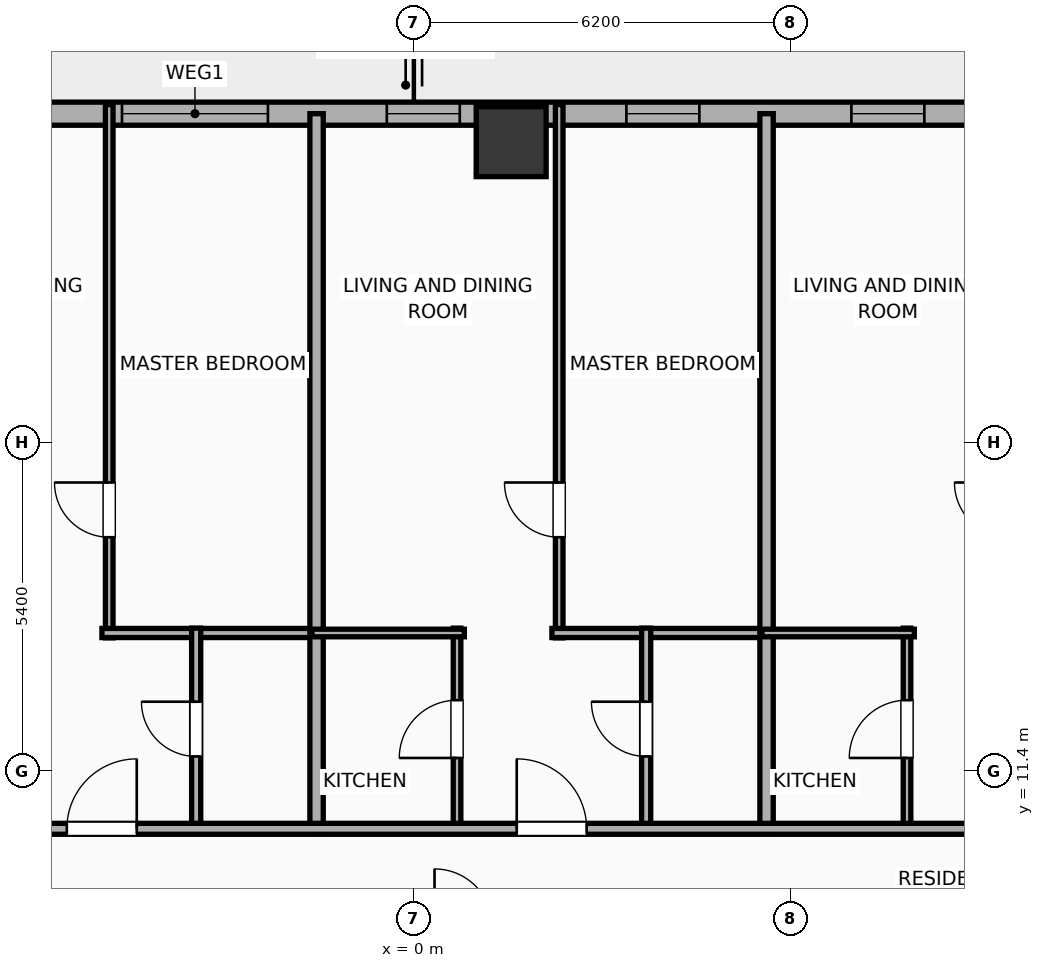
"""IFC4 building model, lengths in metres.
Left out: names, types, materials, properties, quantities, classifications, styles, units other than length and angle.
Written with IfcOpenShell. Run it as: python <this file> out.ifc"""

import sys

from ifc_helpers import new_model, si_unit, direction, frame, frame_2d, origin, origin_2d, place, context, subcontext, project, spatial, rectangle, hollow_rectangle, extrude, element, fill, save


model = new_model("IFC4")
c1 = context("Model", 3, precision=1e-05, world=origin(), true_north=direction((0.0, 1.0)))
c2 = subcontext(c1, "Body", "Model", "MODEL_VIEW")
j1 = project(units=[si_unit("LENGTHUNIT", "METRE"), si_unit("PLANEANGLEUNIT", "RADIAN")], contexts=[c1])
p1 = place(None, origin())
s1 = spatial("IfcSite", under=j1, at=p1, CompositionType="ELEMENT")
p2 = place(p1, origin())
s2 = spatial("IfcBuilding", under=s1, at=p2, CompositionType="ELEMENT")
p3 = place(p2, frame((0.0, 0.0, 26.0)))
s3 = spatial("IfcBuildingStorey", under=s2, at=p3, CompositionType="ELEMENT", Elevation=26.0)
p4 = place(p3, frame((1.6, 21.75, -0.25), z_axis=(0.0, 0.0, 1.0), x_axis=(1.0, 0.0, 0.0)))
e1 = element("IfcColumn", 1, at=p4, inside=s3, PredefinedType="COLUMN", context=c2, shape_type="SweptSolid", body=[
    extrude(hollow_rectangle(XDim=1.15, YDim=1.15, WallThickness=0.04, at=origin_2d()), origin(), (0.0, 0.0, 1.0), 4.15),
])
p5 = place(p3, frame((-29.581, 22.21, 0.0), z_axis=(0.0, 0.0, 1.0), x_axis=(1.0, 0.0, 0.0)))
e2 = element("IfcWall", 2, at=p5, inside=s3, PredefinedType="ELEMENTEDWALL", context=c2, shape_type="SweptSolid", body=[
    extrude(rectangle(XDim=51.963, YDim=0.38, at=frame_2d((25.981, 0.0))), origin(), (0.0, 0.0, 1.0), 2.54),
])
p6 = place(p5, frame((6.61, 0.0, 0.75)))
e3 = element("IfcOpeningElement", 3, at=p6, cuts=e2, PredefinedType="OPENING", context=c2, shape_type="SweptSolid", body=[
    extrude(rectangle(XDim=2.4, YDim=1.63, at=frame_2d((1.2, 0.815))), frame((0.0, 0.2, 0.0), z_axis=(0.0, -1.0, 0.0), x_axis=(1.0, 0.0, 0.0)), (0.0, 0.0, 1.0), 0.4),
])
p7 = place(p5, frame((24.781, 0.0, 0.75)))
e4 = element("IfcOpeningElement", 4, at=p7, cuts=e2, PredefinedType="OPENING", context=c2, shape_type="SweptSolid", body=[
    extrude(rectangle(XDim=2.4, YDim=1.63, at=frame_2d((1.2, 0.815))), frame((0.0, 0.2, 0.0), z_axis=(0.0, -1.0, 0.0), x_axis=(1.0, 0.0, 0.0)), (0.0, 0.0, 1.0), 0.4),
])
p8 = place(p5, frame((42.952, 0.0, 0.75)))
e5 = element("IfcOpeningElement", 5, at=p8, cuts=e2, PredefinedType="OPENING", context=c2, shape_type="SweptSolid", body=[
    extrude(rectangle(XDim=2.4, YDim=1.63, at=frame_2d((1.2, 0.815))), frame((0.0, 0.2, 0.0), z_axis=(0.0, -1.0, 0.0), x_axis=(1.0, 0.0, 0.0)), (0.0, 0.0, 1.0), 0.4),
])
p9 = place(p5, frame((3.476, 0.0, 0.75)))
e6 = element("IfcOpeningElement", 6, at=p9, cuts=e2, PredefinedType="OPENING", context=c2, shape_type="SweptSolid", body=[
    extrude(rectangle(XDim=1.2, YDim=1.63, at=frame_2d((0.6, 0.815))), frame((0.0, 0.2, 0.0), z_axis=(0.0, -1.0, 0.0), x_axis=(1.0, 0.0, 0.0)), (0.0, 0.0, 1.0), 0.4),
])
p10 = place(p5, frame((11.236, 0.0, 0.75)))
e7 = element("IfcOpeningElement", 7, at=p10, cuts=e2, PredefinedType="OPENING", context=c2, shape_type="SweptSolid", body=[
    extrude(rectangle(XDim=1.2, YDim=1.63, at=frame_2d((0.6, 0.815))), frame((0.0, 0.2, 0.0), z_axis=(0.0, -1.0, 0.0), x_axis=(1.0, 0.0, 0.0)), (0.0, 0.0, 1.0), 0.4),
])
p11 = place(p5, frame((14.576, 0.0, 0.75)))
e8 = element("IfcOpeningElement", 8, at=p11, cuts=e2, PredefinedType="OPENING", context=c2, shape_type="SweptSolid", body=[
    extrude(rectangle(XDim=1.2, YDim=1.63, at=frame_2d((0.6, 0.815))), frame((0.0, 0.2, 0.0), z_axis=(0.0, -1.0, 0.0), x_axis=(1.0, 0.0, 0.0)), (0.0, 0.0, 1.0), 0.4),
])
p12 = place(p5, frame((18.276, 0.0, 0.75)))
e9 = element("IfcOpeningElement", 9, at=p12, cuts=e2, PredefinedType="OPENING", context=c2, shape_type="SweptSolid", body=[
    extrude(rectangle(XDim=1.2, YDim=1.63, at=frame_2d((0.6, 0.815))), frame((0.0, 0.2, 0.0), z_axis=(0.0, -1.0, 0.0), x_axis=(1.0, 0.0, 0.0)), (0.0, 0.0, 1.0), 0.4),
])
p13 = place(p5, frame((21.976, 0.0, 0.75)))
e10 = element("IfcOpeningElement", 10, at=p13, cuts=e2, PredefinedType="OPENING", context=c2, shape_type="SweptSolid", body=[
    extrude(rectangle(XDim=1.2, YDim=1.63, at=frame_2d((0.6, 0.815))), frame((0.0, 0.2, 0.0), z_axis=(0.0, -1.0, 0.0), x_axis=(1.0, 0.0, 0.0)), (0.0, 0.0, 1.0), 0.4),
])
p14 = place(p5, frame((29.136, 0.0, 0.75)))
e11 = element("IfcOpeningElement", 11, at=p14, cuts=e2, PredefinedType="OPENING", context=c2, shape_type="SweptSolid", body=[
    extrude(rectangle(XDim=1.2, YDim=1.63, at=frame_2d((0.6, 0.815))), frame((0.0, 0.2, 0.0), z_axis=(0.0, -1.0, 0.0), x_axis=(1.0, 0.0, 0.0)), (0.0, 0.0, 1.0), 0.4),
])
p15 = place(p5, frame((33.076, 0.0, 0.75)))
e12 = element("IfcOpeningElement", 12, at=p15, cuts=e2, PredefinedType="OPENING", context=c2, shape_type="SweptSolid", body=[
    extrude(rectangle(XDim=1.2, YDim=1.63, at=frame_2d((0.6, 0.815))), frame((0.0, 0.2, 0.0), z_axis=(0.0, -1.0, 0.0), x_axis=(1.0, 0.0, 0.0)), (0.0, 0.0, 1.0), 0.4),
])
p16 = place(p5, frame((36.776, 0.0, 0.75)))
e13 = element("IfcOpeningElement", 13, at=p16, cuts=e2, PredefinedType="OPENING", context=c2, shape_type="SweptSolid", body=[
    extrude(rectangle(XDim=1.2, YDim=1.63, at=frame_2d((0.6, 0.815))), frame((0.0, 0.2, 0.0), z_axis=(0.0, -1.0, 0.0), x_axis=(1.0, 0.0, 0.0)), (0.0, 0.0, 1.0), 0.4),
])
p17 = place(p5, frame((39.931, 0.0, 0.75)))
e14 = element("IfcOpeningElement", 14, at=p17, cuts=e2, PredefinedType="OPENING", context=c2, shape_type="SweptSolid", body=[
    extrude(rectangle(XDim=0.85, YDim=1.63, at=frame_2d((0.425, 0.815))), frame((0.0, 0.2, 0.0), z_axis=(0.0, -1.0, 0.0), x_axis=(1.0, 0.0, 0.0)), (0.0, 0.0, 1.0), 0.4),
])
p18 = place(p5, frame((47.469, 0.0, 0.75)))
e15 = element("IfcOpeningElement", 15, at=p18, cuts=e2, PredefinedType="OPENING", context=c2, shape_type="SweptSolid", body=[
    extrude(rectangle(XDim=1.2, YDim=1.63, at=frame_2d((0.6, 0.815))), frame((0.0, 0.2, 0.0), z_axis=(0.0, -1.0, 0.0), x_axis=(1.0, 0.0, 0.0)), (0.0, 0.0, 1.0), 0.4),
])
p19 = place(p5, frame((49.581, 0.0, 0.75)))
e16 = element("IfcOpeningElement", 16, at=p19, cuts=e2, PredefinedType="OPENING", context=c2, shape_type="SweptSolid", body=[
    extrude(rectangle(XDim=1.2, YDim=1.63, at=frame_2d((0.6, 0.815))), frame((0.0, 0.2, 0.0), z_axis=(0.0, -1.0, 0.0), x_axis=(1.0, 0.0, 0.0)), (0.0, 0.0, 1.0), 0.4),
])
p20 = place(p3, frame((-5.01, 13.59, 0.0), z_axis=(0.0, 0.0, 1.0), x_axis=(0.0, 1.0, 0.0)))
e17 = element("IfcWall", 17, at=p20, inside=s3, PredefinedType="PARTITIONING", context=c2, shape_type="SweptSolid", body=[
    extrude(rectangle(XDim=8.77, YDim=0.125, at=frame_2d((4.385, 0.0))), origin(), (0.0, 0.0, 1.0), 3.65),
])
p21 = place(p20, frame((1.655, 0.0, 0.0)))
e18 = element("IfcOpeningElement", 18, at=p21, cuts=e17, PredefinedType="OPENING", context=c2, shape_type="SweptSolid", body=[
    extrude(rectangle(XDim=0.9, YDim=2.05, at=frame_2d((0.45, 1.025))), frame((0.0, 0.073, 0.0), z_axis=(0.0, -1.0, 0.0), x_axis=(1.0, 0.0, 0.0)), (0.0, 0.0, 1.0), 0.145),
])
p22 = place(p3, frame((-5.13, 13.67, 0.0), z_axis=(0.0, 0.0, 1.0), x_axis=(1.0, 0.0, 0.0)))
e19 = element("IfcWall", 19, at=p22, inside=s3, PredefinedType="PLUMBINGWALL", context=c2, shape_type="SweptSolid", body=[
    extrude(rectangle(XDim=3.605, YDim=0.15, at=frame_2d((1.802, 0.0))), origin(), (0.0, 0.0, 1.0), 3.65),
])
p23 = place(p3, frame((-3.58, 10.43, 0.0), z_axis=(0.0, 0.0, 1.0), x_axis=(0.0, 1.0, 0.0)))
e20 = element("IfcWall", 20, at=p23, inside=s3, PredefinedType="PLUMBINGWALL", context=c2, shape_type="SweptSolid", body=[
    extrude(rectangle(XDim=3.32, YDim=0.15, at=frame_2d((1.66, 0.0))), origin(), (0.0, 0.0, 1.0), 3.65),
])
p24 = place(p23, frame((1.21, 0.0, 0.0)))
e21 = element("IfcOpeningElement", 21, at=p24, cuts=e20, PredefinedType="OPENING", context=c2, shape_type="SweptSolid", body=[
    extrude(rectangle(XDim=0.9, YDim=2.05, at=frame_2d((0.45, 1.025))), frame((0.0, 0.085, 0.0), z_axis=(0.0, -1.0, 0.0), x_axis=(1.0, 0.0, 0.0)), (0.0, 0.0, 1.0), 0.17),
])
p25 = place(p3, frame((-1.6, 10.37, 0.0), z_axis=(0.0, 0.0, 1.0), x_axis=(0.0, 1.0, 0.0)))
e22 = element("IfcWall", 22, at=p25, inside=s3, PredefinedType="PARTITIONING", context=c2, shape_type="SweptSolid", body=[
    extrude(rectangle(XDim=11.84, YDim=0.22, at=frame_2d((5.92, 0.0))), origin(), (0.0, 0.0, 1.0), 3.65),
])
p26 = place(p3, frame((2.39, 13.59, 0.0), z_axis=(0.0, 0.0, 1.0), x_axis=(0.0, 1.0, 0.0)))
e23 = element("IfcWall", 23, at=p26, inside=s3, PredefinedType="PARTITIONING", context=c2, shape_type="SweptSolid", body=[
    extrude(rectangle(XDim=8.77, YDim=0.125, at=frame_2d((4.385, 0.0))), origin(), (0.0, 0.0, 1.0), 2.54),
])
p27 = place(p26, frame((1.655, 0.0, 0.0)))
e24 = element("IfcOpeningElement", 24, at=p27, cuts=e23, PredefinedType="OPENING", context=c2, shape_type="SweptSolid", body=[
    extrude(rectangle(XDim=0.9, YDim=2.05, at=frame_2d((0.45, 1.025))), frame((0.0, 0.073, 0.0), z_axis=(0.0, -1.0, 0.0), x_axis=(1.0, 0.0, 0.0)), (0.0, 0.0, 1.0), 0.145),
])
p28 = place(p3, frame((2.27, 13.67, 0.0), z_axis=(0.0, 0.0, 1.0), x_axis=(1.0, 0.0, 0.0)))
e25 = element("IfcWall", 25, at=p28, inside=s3, PredefinedType="PLUMBINGWALL", context=c2, shape_type="SweptSolid", body=[
    extrude(rectangle(XDim=3.605, YDim=0.15, at=frame_2d((1.802, 0.0))), origin(), (0.0, 0.0, 1.0), 3.65),
])
p29 = place(p3, frame((0.71, 10.43, 0.0), z_axis=(0.0, 0.0, 1.0), x_axis=(0.0, 1.0, 0.0)))
e26 = element("IfcWall", 26, at=p29, inside=s3, PredefinedType="PARTITIONING", context=c2, shape_type="SweptSolid", body=[
    extrude(rectangle(XDim=3.32, YDim=0.125, at=frame_2d((1.66, 0.0))), origin(), (0.0, 0.0, 1.0), 3.65),
])
p30 = place(p29, frame((1.185, 0.0, 0.0)))
e27 = element("IfcOpeningElement", 27, at=p30, cuts=e26, PredefinedType="OPENING", context=c2, shape_type="SweptSolid", body=[
    extrude(rectangle(XDim=0.95, YDim=2.05, at=frame_2d((0.475, 1.025))), frame((0.0, 0.073, 0.0), z_axis=(0.0, -1.0, 0.0), x_axis=(1.0, 0.0, 0.0)), (0.0, 0.0, 1.0), 0.145),
])
p31 = place(p3, frame((-1.675, 13.67, 0.0), z_axis=(0.0, 0.0, 1.0), x_axis=(1.0, 0.0, 0.0)))
e28 = element("IfcWall", 28, at=p31, inside=s3, PredefinedType="PARTITIONING", context=c2, shape_type="SweptSolid", body=[
    extrude(rectangle(XDim=2.505, YDim=0.125, at=frame_2d((1.252, 0.0))), origin(), (0.0, 0.0, 1.0), 3.65),
])
p32 = place(p3, frame((3.82, 10.43, 0.0), z_axis=(0.0, 0.0, 1.0), x_axis=(0.0, 1.0, 0.0)))
e29 = element("IfcWall", 29, at=p32, inside=s3, PredefinedType="PLUMBINGWALL", context=c2, shape_type="SweptSolid", body=[
    extrude(rectangle(XDim=3.32, YDim=0.15, at=frame_2d((1.66, 0.0))), origin(), (0.0, 0.0, 1.0), 2.54),
])
p33 = place(p32, frame((1.21, 0.0, 0.0)))
e30 = element("IfcOpeningElement", 30, at=p33, cuts=e29, PredefinedType="OPENING", context=c2, shape_type="SweptSolid", body=[
    extrude(rectangle(XDim=0.9, YDim=2.05, at=frame_2d((0.45, 1.025))), frame((0.0, 0.085, 0.0), z_axis=(0.0, -1.0, 0.0), x_axis=(1.0, 0.0, 0.0)), (0.0, 0.0, 1.0), 0.17),
])
p34 = place(p3, frame((5.8, 10.37, 0.0), z_axis=(0.0, 0.0, 1.0), x_axis=(0.0, 1.0, 0.0)))
e31 = element("IfcWall", 31, at=p34, inside=s3, PredefinedType="PARTITIONING", context=c2, shape_type="SweptSolid", body=[
    extrude(rectangle(XDim=11.84, YDim=0.22, at=frame_2d((5.92, 0.0))), origin(), (0.0, 0.0, 1.0), 3.65),
])
p35 = place(p3, frame((8.11, 10.43, 0.0), z_axis=(0.0, 0.0, 1.0), x_axis=(0.0, 1.0, 0.0)))
e32 = element("IfcWall", 32, at=p35, inside=s3, PredefinedType="PARTITIONING", context=c2, shape_type="SweptSolid", body=[
    extrude(rectangle(XDim=3.32, YDim=0.125, at=frame_2d((1.66, 0.0))), origin(), (0.0, 0.0, 1.0), 3.65),
])
p36 = place(p35, frame((1.185, 0.0, 0.0)))
e33 = element("IfcOpeningElement", 33, at=p36, cuts=e32, PredefinedType="OPENING", context=c2, shape_type="SweptSolid", body=[
    extrude(rectangle(XDim=0.95, YDim=2.05, at=frame_2d((0.475, 1.025))), frame((0.0, 0.073, 0.0), z_axis=(0.0, -1.0, 0.0), x_axis=(1.0, 0.0, 0.0)), (0.0, 0.0, 1.0), 0.145),
])
p37 = place(p3, frame((5.725, 13.67, 0.0), z_axis=(0.0, 0.0, 1.0), x_axis=(1.0, 0.0, 0.0)))
e34 = element("IfcWall", 34, at=p37, inside=s3, PredefinedType="PARTITIONING", context=c2, shape_type="SweptSolid", body=[
    extrude(rectangle(XDim=2.505, YDim=0.125, at=frame_2d((1.252, 0.0))), origin(), (0.0, 0.0, 1.0), 3.65),
])
p38 = place(p3, frame((-33.41, 10.45, 0.0), z_axis=(0.0, 0.0, 1.0), x_axis=(1.0, 0.0, 0.0)))
e35 = element("IfcWall", 35, at=p38, inside=s3, PredefinedType="PARTITIONING", context=c2, shape_type="SweptSolid", body=[
    extrude(rectangle(XDim=59.62, YDim=0.18, at=frame_2d((29.81, 0.0))), origin(), (0.0, 0.0, 1.0), 3.65),
])
p39 = place(p38, frame((4.529, 0.0, 0.0)))
e36 = element("IfcOpeningElement", 36, at=p39, cuts=e35, PredefinedType="OPENING", context=c2, shape_type="SweptSolid", body=[
    extrude(rectangle(XDim=1.15, YDim=2.05, at=frame_2d((0.575, 1.025))), frame((0.0, 0.1, 0.0), z_axis=(0.0, -1.0, 0.0), x_axis=(1.0, 0.0, 0.0)), (0.0, 0.0, 1.0), 0.2),
])
p40 = place(p38, frame((12.899, 0.0, 0.0)))
e37 = element("IfcOpeningElement", 37, at=p40, cuts=e35, PredefinedType="OPENING", context=c2, shape_type="SweptSolid", body=[
    extrude(rectangle(XDim=1.15, YDim=2.05, at=frame_2d((0.575, 1.025))), frame((0.0, 0.1, 0.0), z_axis=(0.0, -1.0, 0.0), x_axis=(1.0, 0.0, 0.0)), (0.0, 0.0, 1.0), 0.2),
])
p41 = place(p38, frame((20.298, 0.0, 0.0)))
e38 = element("IfcOpeningElement", 38, at=p41, cuts=e35, PredefinedType="OPENING", context=c2, shape_type="SweptSolid", body=[
    extrude(rectangle(XDim=1.15, YDim=2.05, at=frame_2d((0.575, 1.025))), frame((0.0, 0.1, 0.0), z_axis=(0.0, -1.0, 0.0), x_axis=(1.0, 0.0, 0.0)), (0.0, 0.0, 1.0), 0.2),
])
p42 = place(p38, frame((27.703, 0.0, 0.0)))
e39 = element("IfcOpeningElement", 39, at=p42, cuts=e35, PredefinedType="OPENING", context=c2, shape_type="SweptSolid", body=[
    extrude(rectangle(XDim=1.15, YDim=2.05, at=frame_2d((0.575, 1.025))), frame((0.0, 0.1, 0.0), z_axis=(0.0, -1.0, 0.0), x_axis=(1.0, 0.0, 0.0)), (0.0, 0.0, 1.0), 0.2),
])
p43 = place(p38, frame((35.102, 0.0, 0.0)))
e40 = element("IfcOpeningElement", 40, at=p43, cuts=e35, PredefinedType="OPENING", context=c2, shape_type="SweptSolid", body=[
    extrude(rectangle(XDim=1.15, YDim=2.05, at=frame_2d((0.575, 1.025))), frame((0.0, 0.1, 0.0), z_axis=(0.0, -1.0, 0.0), x_axis=(1.0, 0.0, 0.0)), (0.0, 0.0, 1.0), 0.2),
])
p44 = place(p38, frame((42.5, 0.0, 0.0)))
e41 = element("IfcOpeningElement", 41, at=p44, cuts=e35, PredefinedType="OPENING", context=c2, shape_type="SweptSolid", body=[
    extrude(rectangle(XDim=1.15, YDim=2.05, at=frame_2d((0.575, 1.025))), frame((0.0, 0.1, 0.0), z_axis=(0.0, -1.0, 0.0), x_axis=(1.0, 0.0, 0.0)), (0.0, 0.0, 1.0), 0.2),
])
p45 = place(p38, frame((48.099, 0.0, 0.0)))
e42 = element("IfcOpeningElement", 42, at=p45, cuts=e35, PredefinedType="OPENING", context=c2, shape_type="SweptSolid", body=[
    extrude(rectangle(XDim=1.15, YDim=2.05, at=frame_2d((0.575, 1.025))), frame((0.0, 0.1, 0.0), z_axis=(0.0, -1.0, 0.0), x_axis=(1.0, 0.0, 0.0)), (0.0, 0.0, 1.0), 0.2),
])
p46 = place(p38, frame((56.117, 0.0, 0.0)))
e43 = element("IfcOpeningElement", 43, at=p46, cuts=e35, PredefinedType="OPENING", context=c2, shape_type="SweptSolid", body=[
    extrude(rectangle(XDim=0.9, YDim=2.05, at=frame_2d((0.45, 1.025))), frame((0.0, 0.1, 0.0), z_axis=(0.0, -1.0, 0.0), x_axis=(1.0, 0.0, 0.0)), (0.0, 0.0, 1.0), 0.2),
])
p47 = place(p7, origin())
e44 = element("IfcWindow", 44, at=p47, inside=s3, PartitioningType="SINGLE_PANEL", PredefinedType="WINDOW", context=c2, shape_type="SweptSolid", body=[
    extrude(rectangle(XDim=2.4, YDim=1.63, at=frame_2d((1.2, 0.815))), frame((0.0, 0.03, 0.0), z_axis=(0.0, -1.0, 0.0), x_axis=(1.0, 0.0, 0.0)), (0.0, 0.0, 1.0), 0.06),
])
fill(e4, e44)
p48 = place(p14, origin())
e45 = element("IfcWindow", 45, at=p48, inside=s3, PartitioningType="SINGLE_PANEL", PredefinedType="WINDOW", context=c2, shape_type="SweptSolid", body=[
    extrude(rectangle(XDim=1.2, YDim=1.63, at=frame_2d((0.6, 0.815))), frame((0.0, 0.03, 0.0), z_axis=(0.0, -1.0, 0.0), x_axis=(1.0, 0.0, 0.0)), (0.0, 0.0, 1.0), 0.06),
])
fill(e11, e45)
p49 = place(p15, origin())
e46 = element("IfcWindow", 46, at=p49, inside=s3, PartitioningType="SINGLE_PANEL", PredefinedType="WINDOW", context=c2, shape_type="SweptSolid", body=[
    extrude(rectangle(XDim=1.2, YDim=1.63, at=frame_2d((0.6, 0.815))), frame((0.0, 0.03, 0.0), z_axis=(0.0, -1.0, 0.0), x_axis=(1.0, 0.0, 0.0)), (0.0, 0.0, 1.0), 0.06),
])
fill(e12, e46)
p50 = place(p16, origin())
e47 = element("IfcWindow", 47, at=p50, inside=s3, PartitioningType="SINGLE_PANEL", PredefinedType="WINDOW", context=c2, shape_type="SweptSolid", body=[
    extrude(rectangle(XDim=1.2, YDim=1.63, at=frame_2d((0.6, 0.815))), frame((0.0, 0.03, 0.0), z_axis=(0.0, -1.0, 0.0), x_axis=(1.0, 0.0, 0.0)), (0.0, 0.0, 1.0), 0.06),
])
fill(e13, e47)
p51 = place(p21, origin())
e48 = element("IfcDoor", 48, at=p51, inside=s3, OperationType="SINGLE_SWING_RIGHT", PredefinedType="DOOR", context=c2, shape_type="SweptSolid", body=[
    extrude(rectangle(XDim=0.9, YDim=2.05, at=frame_2d((0.45, 1.025))), frame((0.0, 0.025, 0.0), z_axis=(0.0, -1.0, 0.0), x_axis=(1.0, 0.0, 0.0)), (0.0, 0.0, 1.0), 0.05),
])
fill(e18, e48)
p52 = place(p24, origin())
e49 = element("IfcDoor", 49, at=p52, inside=s3, OperationType="SINGLE_SWING_RIGHT", PredefinedType="DOOR", context=c2, shape_type="SweptSolid", body=[
    extrude(rectangle(XDim=0.9, YDim=2.05, at=frame_2d((0.45, 1.025))), frame((0.0, 0.025, 0.0), z_axis=(0.0, -1.0, 0.0), x_axis=(1.0, 0.0, 0.0)), (0.0, 0.0, 1.0), 0.05),
])
fill(e21, e49)
p53 = place(p27, origin())
e50 = element("IfcDoor", 50, at=p53, inside=s3, OperationType="SINGLE_SWING_RIGHT", PredefinedType="DOOR", context=c2, shape_type="SweptSolid", body=[
    extrude(rectangle(XDim=0.9, YDim=2.05, at=frame_2d((0.45, 1.025))), frame((0.0, 0.025, 0.0), z_axis=(0.0, -1.0, 0.0), x_axis=(1.0, 0.0, 0.0)), (0.0, 0.0, 1.0), 0.05),
])
fill(e24, e50)
p54 = place(p30, origin())
e51 = element("IfcDoor", 51, at=p54, inside=s3, OperationType="SINGLE_SWING_LEFT", PredefinedType="DOOR", context=c2, shape_type="SweptSolid", body=[
    extrude(rectangle(XDim=0.95, YDim=2.05, at=frame_2d((0.475, 1.025))), frame((0.0, 0.025, 0.0), z_axis=(0.0, -1.0, 0.0), x_axis=(1.0, 0.0, 0.0)), (0.0, 0.0, 1.0), 0.05),
])
fill(e27, e51)
p55 = place(p33, origin())
e52 = element("IfcDoor", 52, at=p55, inside=s3, OperationType="SINGLE_SWING_RIGHT", PredefinedType="DOOR", context=c2, shape_type="SweptSolid", body=[
    extrude(rectangle(XDim=0.9, YDim=2.05, at=frame_2d((0.45, 1.025))), frame((0.0, 0.025, 0.0), z_axis=(0.0, -1.0, 0.0), x_axis=(1.0, 0.0, 0.0)), (0.0, 0.0, 1.0), 0.05),
])
fill(e30, e52)
p56 = place(p36, origin())
e53 = element("IfcDoor", 53, at=p56, inside=s3, OperationType="SINGLE_SWING_LEFT", PredefinedType="DOOR", context=c2, shape_type="SweptSolid", body=[
    extrude(rectangle(XDim=0.95, YDim=2.05, at=frame_2d((0.475, 1.025))), frame((0.0, 0.025, 0.0), z_axis=(0.0, -1.0, 0.0), x_axis=(1.0, 0.0, 0.0)), (0.0, 0.0, 1.0), 0.05),
])
fill(e33, e53)
p57 = place(p42, origin())
e54 = element("IfcDoor", 54, at=p57, inside=s3, OperationType="SINGLE_SWING_RIGHT", PredefinedType="DOOR", context=c2, shape_type="SweptSolid", body=[
    extrude(rectangle(XDim=1.15, YDim=2.05, at=frame_2d((0.575, 1.025))), frame((0.0, 0.025, 0.0), z_axis=(0.0, -1.0, 0.0), x_axis=(1.0, 0.0, 0.0)), (0.0, 0.0, 1.0), 0.05),
])
fill(e39, e54)
p58 = place(p43, origin())
e55 = element("IfcDoor", 55, at=p58, inside=s3, OperationType="SINGLE_SWING_LEFT", PredefinedType="DOOR", context=c2, shape_type="SweptSolid", body=[
    extrude(rectangle(XDim=1.15, YDim=2.05, at=frame_2d((0.575, 1.025))), frame((0.0, 0.025, 0.0), z_axis=(0.0, -1.0, 0.0), x_axis=(1.0, 0.0, 0.0)), (0.0, 0.0, 1.0), 0.05),
])
fill(e40, e55)
save(model, sys.argv[1])
